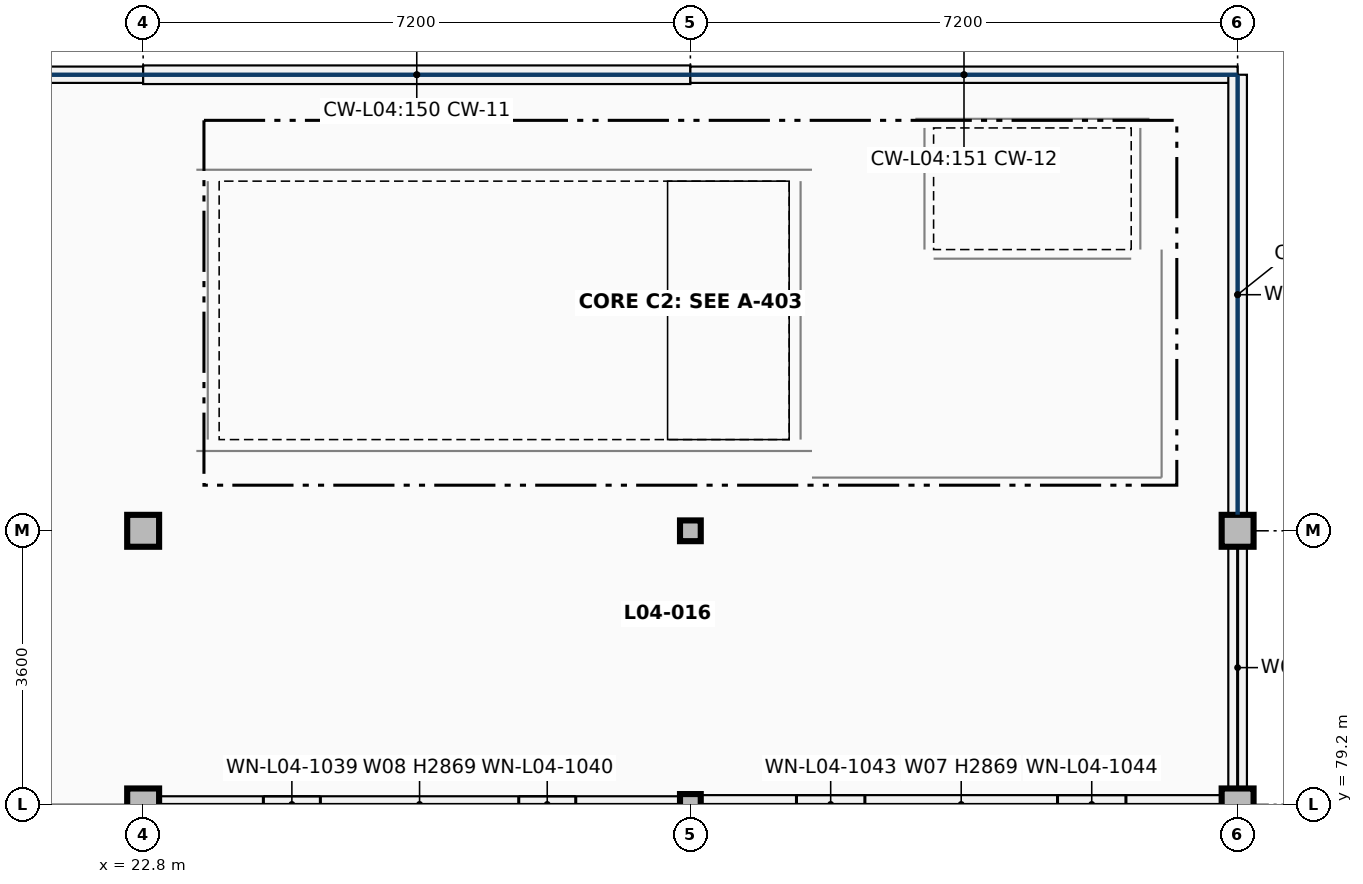
"""IFC4 building model, lengths in metres.
Left out: names, types, materials, properties, quantities, classifications, styles, units other than length and angle.
Written with IfcOpenShell. Run it as: python <this file> out.ifc"""

import sys

from ifc_helpers import new_model, si_unit, direction, frame, frame_2d, origin, origin_2d, place, context, subcontext, project, spatial, rectangle, hollow_circle, extrude, element, fill, save


model = new_model("IFC4")
c1 = context("Model", 3, precision=1e-05, world=origin(), true_north=direction((0.0, 1.0)))
c2 = subcontext(c1, "Body", "Model", "MODEL_VIEW")
j1 = project(units=[si_unit("LENGTHUNIT", "METRE"), si_unit("PLANEANGLEUNIT", "RADIAN")], contexts=[c1])
p1 = place(None, origin())
s1 = spatial("IfcSite", under=j1, at=p1, CompositionType="ELEMENT")
p2 = place(p1, origin())
s2 = spatial("IfcBuilding", under=s1, at=p2, CompositionType="ELEMENT")
p3 = place(p2, frame((0.0, 0.0, 17.34)))
s3 = spatial("IfcBuildingStorey", under=s2, at=p3, CompositionType="ELEMENT", Elevation=17.34)
for number, where, z_axis, x_axis in (
    (1, (22.8, 79.2, 0.0), (0.0, 0.0, 1.0), (1.0, 0.0, 0.0)),
    (2, (22.8, 82.8, 0.0), (0.0, 0.0, 1.0), (1.0, 0.0, 0.0)),
):
    element("IfcColumn", number, at=place(p3, frame(where, z_axis=z_axis, x_axis=x_axis)), inside=s3, PredefinedType="COLUMN", context=c2, shape_type="SweptSolid", body=[
        extrude(rectangle(XDim=0.42, YDim=0.42, at=origin_2d()), origin(), (0.0, 0.0, 1.0), 3.74),
    ])
for number, where, z_axis, x_axis in (
    (3, (30.0, 79.2, 0.0), (0.0, 0.0, 1.0), (1.0, 0.0, 0.0)),
    (4, (30.0, 82.8, 0.0), (0.0, 0.0, 1.0), (1.0, 0.0, 0.0)),
):
    element("IfcColumn", number, at=place(p3, frame(where, z_axis=z_axis, x_axis=x_axis)), inside=s3, PredefinedType="COLUMN", context=c2, shape_type="SweptSolid", body=[
        extrude(hollow_circle(Radius=0.136, WallThickness=0.012, at=origin_2d()), origin(), (0.0, 0.0, 1.0), 3.7),
    ])
for number, where, z_axis, x_axis in (
    (5, (37.2, 79.2, 0.0), (0.0, 0.0, 1.0), (1.0, 0.0, 0.0)),
    (6, (37.2, 82.8, 0.0), (0.0, 0.0, 1.0), (1.0, 0.0, 0.0)),
):
    element("IfcColumn", number, at=place(p3, frame(where, z_axis=z_axis, x_axis=x_axis)), inside=s3, PredefinedType="COLUMN", context=c2, shape_type="SweptSolid", body=[
        extrude(rectangle(XDim=0.42, YDim=0.42, at=origin_2d()), origin(), (0.0, 0.0, 1.0), 3.74),
    ])
p4 = place(p3, frame((15.6, 88.8, 0.0), z_axis=(0.0, 0.0, 1.0), x_axis=(1.0, 0.0, 0.0)))
e7 = element("IfcWall", 7, at=p4, inside=s3, PredefinedType="SOLIDWALL", context=c2, shape_type="SweptSolid", body=[
    extrude(rectangle(XDim=7.2, YDim=0.215, at=frame_2d((3.6, 0.0))), origin(), (0.0, 0.0, 1.0), 0.85),
])
p5 = place(p3, frame((22.8, 88.8, 0.0), z_axis=(0.0, 0.0, 1.0), x_axis=(1.0, 0.0, 0.0)))
e8 = element("IfcWall", 8, at=p5, inside=s3, PredefinedType="SOLIDWALL", context=c2, shape_type="SweptSolid", body=[
    extrude(rectangle(XDim=7.2, YDim=0.245, at=frame_2d((3.6, 0.0))), origin(), (0.0, 0.0, 1.0), 0.85),
])
p6 = place(p3, frame((30.0, 88.8, 0.0), z_axis=(0.0, 0.0, 1.0), x_axis=(1.0, 0.0, 0.0)))
e9 = element("IfcWall", 9, at=p6, inside=s3, PredefinedType="SOLIDWALL", context=c2, shape_type="SweptSolid", body=[
    extrude(rectangle(XDim=7.2, YDim=0.215, at=frame_2d((3.6, 0.0))), origin(), (0.0, 0.0, 1.0), 0.85),
])
p7 = place(p3, frame((37.2, 79.412, 0.0), z_axis=(0.0, 0.0, 1.0), x_axis=(0.0, 1.0, 0.0)))
e10 = element("IfcWall", 10, at=p7, inside=s3, PredefinedType="SOLIDWALL", context=c2, shape_type="SweptSolid", body=[
    extrude(rectangle(XDim=3.176, YDim=0.245, at=frame_2d((1.588, 0.0))), origin(), (0.0, 0.0, 1.0), 2.869),
])
p8 = place(p3, frame((37.2, 83.012, 0.0), z_axis=(0.0, 0.0, 1.0), x_axis=(0.0, 1.0, 0.0)))
e11 = element("IfcWall", 11, at=p8, inside=s3, PredefinedType="SOLIDWALL", context=c2, shape_type="SweptSolid", body=[
    extrude(rectangle(XDim=5.788, YDim=0.245, at=frame_2d((2.894, 0.0))), origin(), (0.0, 0.0, 1.0), 0.85),
])
p9 = place(p3, frame((23.012, 79.2, 0.0), z_axis=(0.0, 0.0, 1.0), x_axis=(1.0, 0.0, 0.0)))
e12 = element("IfcWall", 12, at=p9, inside=s3, PredefinedType="SOLIDWALL", context=c2, shape_type="SweptSolid", body=[
    extrude(rectangle(XDim=6.85, YDim=0.215, at=frame_2d((3.425, 0.0))), origin(), (0.0, 0.0, 1.0), 2.869),
])
p10 = place(p9, frame((1.37, 0.0, 0.75)))
e13 = element("IfcOpeningElement", 13, at=p10, cuts=e12, PredefinedType="OPENING", context=c2, shape_type="SweptSolid", body=[
    extrude(rectangle(XDim=0.75, YDim=1.7, at=frame_2d((0.375, 0.85))), frame((0.0, 0.118, 0.0), z_axis=(0.0, -1.0, 0.0), x_axis=(1.0, 0.0, 0.0)), (0.0, 0.0, 1.0), 0.235),
])
p11 = place(p9, frame((4.729, 0.0, 0.75)))
e14 = element("IfcOpeningElement", 14, at=p11, cuts=e12, PredefinedType="OPENING", context=c2, shape_type="SweptSolid", body=[
    extrude(rectangle(XDim=0.75, YDim=1.7, at=frame_2d((0.375, 0.85))), frame((0.0, 0.118, 0.0), z_axis=(0.0, -1.0, 0.0), x_axis=(1.0, 0.0, 0.0)), (0.0, 0.0, 1.0), 0.235),
])
p12 = place(p3, frame((30.138, 79.2, 0.0), z_axis=(0.0, 0.0, 1.0), x_axis=(1.0, 0.0, 0.0)))
e15 = element("IfcWall", 15, at=p12, inside=s3, PredefinedType="SOLIDWALL", context=c2, shape_type="SweptSolid", body=[
    extrude(rectangle(XDim=6.85, YDim=0.245, at=frame_2d((3.425, 0.0))), origin(), (0.0, 0.0, 1.0), 2.869),
])
p13 = place(p12, frame((1.257, 0.0, 0.75)))
e16 = element("IfcOpeningElement", 16, at=p13, cuts=e15, PredefinedType="OPENING", context=c2, shape_type="SweptSolid", body=[
    extrude(rectangle(XDim=0.9, YDim=1.95, at=frame_2d((0.45, 0.975))), frame((0.0, 0.133, 0.0), z_axis=(0.0, -1.0, 0.0), x_axis=(1.0, 0.0, 0.0)), (0.0, 0.0, 1.0), 0.265),
])
p14 = place(p12, frame((4.692, 0.0, 0.75)))
e17 = element("IfcOpeningElement", 17, at=p14, cuts=e15, PredefinedType="OPENING", context=c2, shape_type="SweptSolid", body=[
    extrude(rectangle(XDim=0.9, YDim=1.95, at=frame_2d((0.45, 0.975))), frame((0.0, 0.133, 0.0), z_axis=(0.0, -1.0, 0.0), x_axis=(1.0, 0.0, 0.0)), (0.0, 0.0, 1.0), 0.265),
])
p15 = place(p3, frame((23.65, 84.0, 0.0), z_axis=(0.0, 0.0, 1.0), x_axis=(0.0, 1.0, 0.0)))
e18 = element("IfcWall", 18, at=p15, inside=s3, PredefinedType="SHEAR", context=c2, shape_type="SweptSolid", body=[
    extrude(rectangle(XDim=3.4, YDim=0.3, at=frame_2d((1.7, 0.0))), origin(), (0.0, 0.0, 1.0), 3.74),
])
for number, where, z_axis, x_axis in (
    (19, (23.5, 83.85, 0.0), (0.0, 0.0, 1.0), (1.0, 0.0, 0.0)),
    (20, (23.5, 87.55, 0.0), (0.0, 0.0, 1.0), (1.0, 0.0, 0.0)),
):
    element("IfcWall", number, at=place(p3, frame(where, z_axis=z_axis, x_axis=x_axis)), inside=s3, PredefinedType="SHEAR", context=c2, shape_type="SweptSolid", body=[
        extrude(rectangle(XDim=8.1, YDim=0.3, at=frame_2d((4.05, 0.0))), origin(), (0.0, 0.0, 1.0), 3.74),
    ])
p16 = place(p3, frame((31.45, 84.0, 0.0), z_axis=(0.0, 0.0, 1.0), x_axis=(0.0, 1.0, 0.0)))
e21 = element("IfcWall", 21, at=p16, inside=s3, PredefinedType="SHEAR", context=c2, shape_type="SweptSolid", body=[
    extrude(rectangle(XDim=3.4, YDim=0.3, at=frame_2d((1.7, 0.0))), origin(), (0.0, 0.0, 1.0), 3.74),
])
p17 = place(p16, frame((0.65, 0.0, 0.0)))
e22 = element("IfcOpeningElement", 22, at=p17, cuts=e21, PredefinedType="OPENING", context=c2, shape_type="SweptSolid", body=[
    extrude(rectangle(XDim=1.2, YDim=2.2, at=frame_2d((0.6, 1.1))), frame((0.0, 0.16, 0.0), z_axis=(0.0, -1.0, 0.0), x_axis=(1.0, 0.0, 0.0)), (0.0, 0.0, 1.0), 0.32),
])
for number, where, z_axis, x_axis in (
    (23, (33.08, 86.5, 0.0), (0.0, 0.0, 1.0), (0.0, 1.0, 0.0)),
    (24, (35.92, 86.5, 0.0), (0.0, 0.0, 1.0), (0.0, 1.0, 0.0)),
):
    element("IfcWall", number, at=place(p3, frame(where, z_axis=z_axis, x_axis=x_axis)), inside=s3, PredefinedType="SHEAR", context=c2, shape_type="SweptSolid", body=[
        extrude(rectangle(XDim=1.6, YDim=0.24, at=frame_2d((0.8, 0.0))), origin(), (0.0, 0.0, 1.0), 3.74),
    ])
p18 = place(p3, frame((32.96, 88.22, 0.0), z_axis=(0.0, 0.0, 1.0), x_axis=(1.0, 0.0, 0.0)))
e25 = element("IfcWall", 25, at=p18, inside=s3, PredefinedType="SHEAR", context=c2, shape_type="SweptSolid", body=[
    extrude(rectangle(XDim=3.08, YDim=0.24, at=frame_2d((1.54, 0.0))), origin(), (0.0, 0.0, 1.0), 3.74),
])
p19 = place(p3, frame((33.2, 86.38, 0.0), z_axis=(0.0, 0.0, 1.0), x_axis=(1.0, 0.0, 0.0)))
e26 = element("IfcWall", 26, at=p19, inside=s3, PredefinedType="SHEAR", context=c2, shape_type="SweptSolid", body=[
    extrude(rectangle(XDim=2.6, YDim=0.24, at=frame_2d((1.3, 0.0))), origin(), (0.0, 0.0, 1.0), 3.74),
])
p20 = place(p19, frame((0.8, 0.0, 0.0)))
e27 = element("IfcOpeningElement", 27, at=p20, cuts=e26, PredefinedType="OPENING", context=c2, shape_type="SweptSolid", body=[
    extrude(rectangle(XDim=1.0, YDim=2.15, at=frame_2d((0.5, 1.075))), frame((0.0, 0.13, 0.0), z_axis=(0.0, -1.0, 0.0), x_axis=(1.0, 0.0, 0.0)), (0.0, 0.0, 1.0), 0.26),
])
p21 = place(p3, frame((36.2, 83.5, 0.0), z_axis=(0.0, 0.0, 1.0), x_axis=(0.0, 1.0, 0.0)))
e28 = element("IfcWall", 28, at=p21, inside=s3, PredefinedType="PARTITIONING", context=c2, shape_type="SweptSolid", body=[
    extrude(rectangle(XDim=3.0, YDim=0.2, at=frame_2d((1.5, 0.0))), origin(), (0.0, 0.0, 1.0), 3.414),
])
p22 = place(p3, frame((31.6, 83.5, 0.0), z_axis=(0.0, 0.0, 1.0), x_axis=(1.0, 0.0, 0.0)))
e29 = element("IfcWall", 29, at=p22, inside=s3, PredefinedType="PARTITIONING", context=c2, shape_type="SweptSolid", body=[
    extrude(rectangle(XDim=4.6, YDim=0.2, at=frame_2d((2.3, 0.0))), origin(), (0.0, 0.0, 1.0), 3.414),
])
p23 = place(p22, frame((1.575, 0.0, 0.0)))
e30 = element("IfcOpeningElement", 30, at=p23, cuts=e29, PredefinedType="OPENING", context=c2, shape_type="SweptSolid", body=[
    extrude(rectangle(XDim=1.45, YDim=2.2, at=frame_2d((0.725, 1.1))), frame((0.0, 0.11, 0.0), z_axis=(0.0, -1.0, 0.0), x_axis=(1.0, 0.0, 0.0)), (0.0, 0.0, 1.0), 0.22),
])
p24 = place(p10, origin())
e31 = element("IfcWindow", 31, at=p24, inside=s3, PartitioningType="SINGLE_PANEL", PredefinedType="WINDOW", context=c2, shape_type="SweptSolid", body=[
    extrude(rectangle(XDim=0.75, YDim=1.7, at=frame_2d((0.375, 0.85))), frame((0.0, 0.03, 0.0), z_axis=(0.0, -1.0, 0.0), x_axis=(1.0, 0.0, 0.0)), (0.0, 0.0, 1.0), 0.06),
])
fill(e13, e31)
p25 = place(p11, origin())
e32 = element("IfcWindow", 32, at=p25, inside=s3, PartitioningType="SINGLE_PANEL", PredefinedType="WINDOW", context=c2, shape_type="SweptSolid", body=[
    extrude(rectangle(XDim=0.75, YDim=1.7, at=frame_2d((0.375, 0.85))), frame((0.0, 0.03, 0.0), z_axis=(0.0, -1.0, 0.0), x_axis=(1.0, 0.0, 0.0)), (0.0, 0.0, 1.0), 0.06),
])
fill(e14, e32)
p26 = place(p13, origin())
e33 = element("IfcWindow", 33, at=p26, inside=s3, PartitioningType="SINGLE_PANEL", PredefinedType="WINDOW", context=c2, shape_type="SweptSolid", body=[
    extrude(rectangle(XDim=0.9, YDim=1.95, at=frame_2d((0.45, 0.975))), frame((0.0, 0.03, 0.0), z_axis=(0.0, -1.0, 0.0), x_axis=(1.0, 0.0, 0.0)), (0.0, 0.0, 1.0), 0.06),
])
fill(e16, e33)
p27 = place(p14, origin())
e34 = element("IfcWindow", 34, at=p27, inside=s3, PartitioningType="SINGLE_PANEL", PredefinedType="WINDOW", context=c2, shape_type="SweptSolid", body=[
    extrude(rectangle(XDim=0.9, YDim=1.95, at=frame_2d((0.45, 0.975))), frame((0.0, 0.03, 0.0), z_axis=(0.0, -1.0, 0.0), x_axis=(1.0, 0.0, 0.0)), (0.0, 0.0, 1.0), 0.06),
])
fill(e17, e34)
p28 = place(p17, origin())
e35 = element("IfcDoor", 35, at=p28, inside=s3, OperationType="SINGLE_SWING_LEFT", PredefinedType="DOOR", context=c2, shape_type="SweptSolid", body=[
    extrude(rectangle(XDim=1.2, YDim=2.2, at=frame_2d((0.6, 1.1))), frame((0.0, 0.025, 0.0), z_axis=(0.0, -1.0, 0.0), x_axis=(1.0, 0.0, 0.0)), (0.0, 0.0, 1.0), 0.05),
])
fill(e22, e35)
p29 = place(p20, origin())
e36 = element("IfcDoor", 36, at=p29, inside=s3, OperationType="DOUBLE_DOOR_SLIDING", PredefinedType="DOOR", context=c2, shape_type="SweptSolid", body=[
    extrude(rectangle(XDim=1.0, YDim=2.15, at=frame_2d((0.5, 1.075))), frame((0.0, 0.025, 0.0), z_axis=(0.0, -1.0, 0.0), x_axis=(1.0, 0.0, 0.0)), (0.0, 0.0, 1.0), 0.05),
])
fill(e27, e36)
p30 = place(p23, frame((1.45, 0.0, 0.0), z_axis=(0.0, 0.0, 1.0), x_axis=(-1.0, 0.0, 0.0)))
e37 = element("IfcDoor", 37, at=p30, inside=s3, OperationType="DOUBLE_DOOR_SINGLE_SWING", PredefinedType="DOOR", context=c2, shape_type="SweptSolid", body=[
    extrude(rectangle(XDim=1.45, YDim=2.2, at=frame_2d((0.725, 1.1))), frame((0.0, 0.025, 0.0), z_axis=(0.0, -1.0, 0.0), x_axis=(1.0, 0.0, 0.0)), (0.0, 0.0, 1.0), 0.05),
])
fill(e30, e37)
save(model, sys.argv[1])
